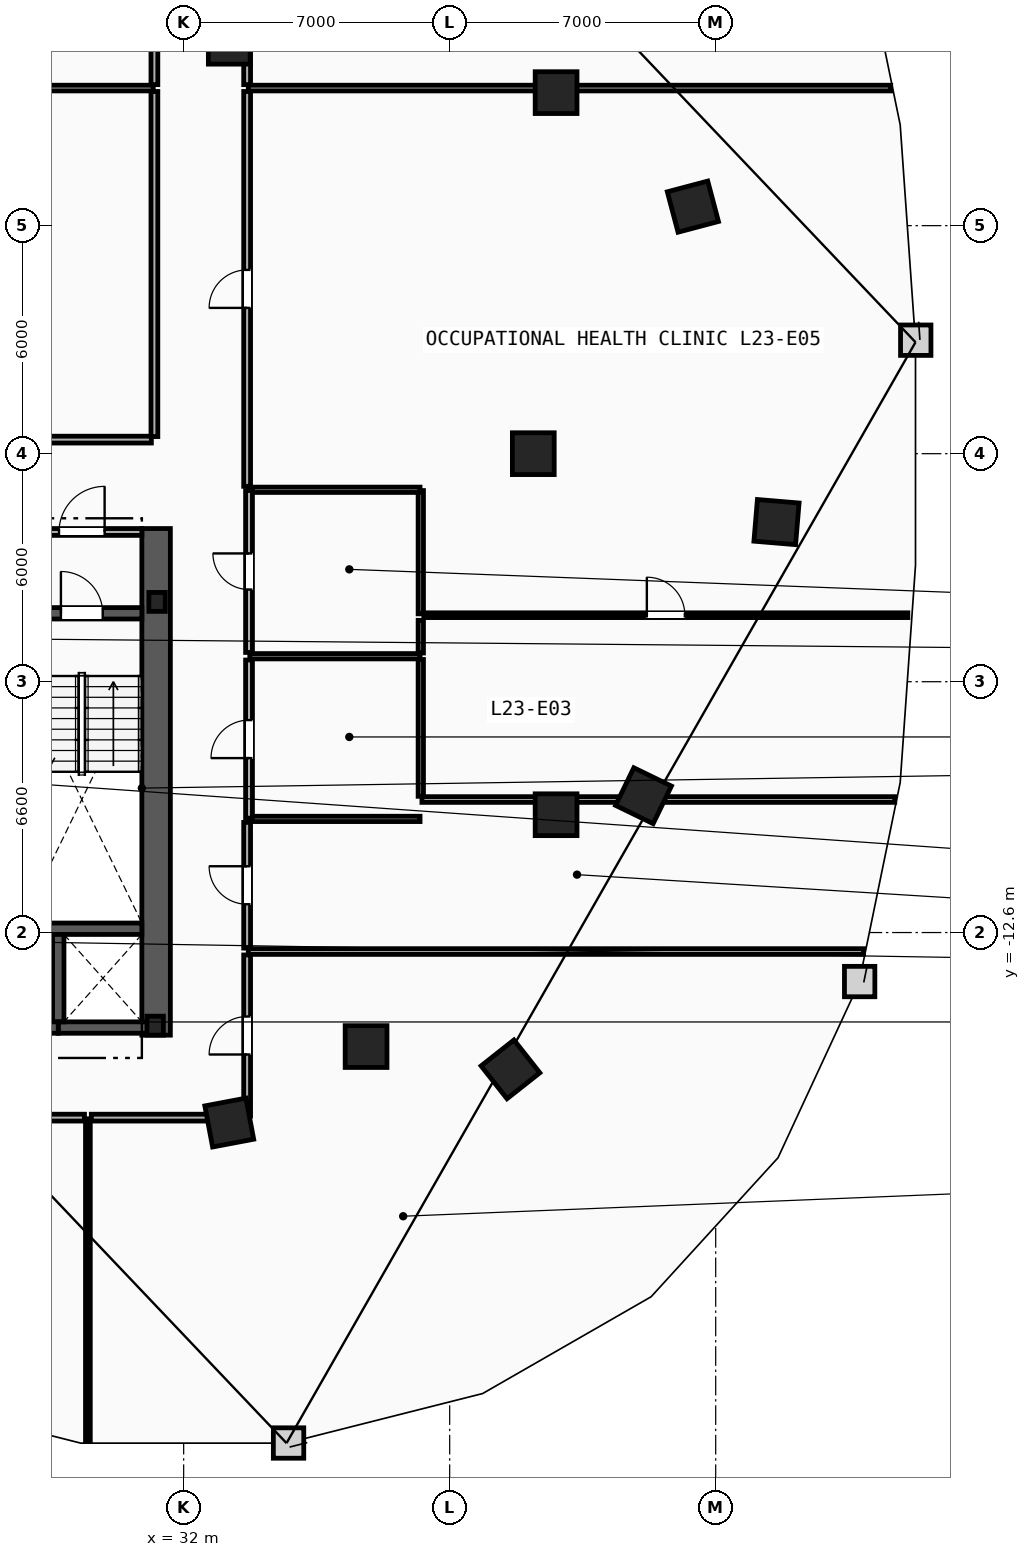
"""IFC4 building model, lengths in metres.
Left out: names, types, materials, properties, quantities, classifications, styles, units other than length and angle.
Written with IfcOpenShell. Run it as: python <this file> out.ifc"""

import sys

from ifc_helpers import new_model, si_unit, direction, frame, frame_2d, origin, origin_2d, place, context, subcontext, project, spatial, rectangle, i_section, extrude, element, fill, save


model = new_model("IFC4")
c1 = context("Model", 3, precision=1e-05, world=origin(), true_north=direction((0.0, 1.0)))
c2 = subcontext(c1, "Body", "Model", "MODEL_VIEW")
j1 = project(units=[si_unit("LENGTHUNIT", "METRE"), si_unit("PLANEANGLEUNIT", "RADIAN")], contexts=[c1])
p1 = place(None, origin())
s1 = spatial("IfcSite", under=j1, at=p1, CompositionType="ELEMENT")
p2 = place(p1, origin())
s2 = spatial("IfcBuilding", under=s1, at=p2, CompositionType="ELEMENT")
p3 = place(p2, frame((0.0, 0.0, 92.6)))
s3 = spatial("IfcBuildingStorey", under=s2, at=p3, CompositionType="ELEMENT", Elevation=92.6)
for number, where, z_axis, x_axis in (
    (1, (31.3, -3.9, 0.0), (0.0, 0.0, 1.0), (1.0, 0.0, 0.0)),
    (2, (31.25, -15.05, 0.0), (0.0, 0.0, 1.0), (1.0, 0.0, 0.0)),
):
    element("IfcColumn", number, at=place(p3, frame(where, z_axis=z_axis, x_axis=x_axis)), inside=s3, PredefinedType="COLUMN", context=c2, shape_type="SweptSolid", body=[
        extrude(i_section(OverallWidth=0.432, OverallDepth=0.498, WebThickness=0.056, FlangeThickness=0.089, FilletRadius=0.018, at=origin_2d()), origin(), (0.0, 0.0, 1.0), 3.6),
    ])
for number, where, z_axis, x_axis in (
    (3, (41.2, 0.0, 0.0), (0.0, 0.0, 1.0), (1.0, 0.0, 0.0)),
    (4, (41.8, -9.5, 0.0), (0.0, 0.0, 1.0), (1.0, 0.0, 0.0)),
    (5, (36.8, -15.6, 0.0), (0.0, 0.0, 1.0), (1.0, 0.0, 0.0)),
    (6, (41.8, 9.5, 0.0), (0.0, 0.0, 1.0), (1.0, 0.0, 0.0)),
    (7, (33.2, 10.8, 0.0), (0.0, 0.0, 1.0), (1.0, 0.0, 0.0)),
    (8, (33.2, -17.6, 0.0), (0.0, 0.0, 1.0), (0.983, 0.186, 0.0)),
    (9, (40.6, -16.2, 0.0), (0.0, 0.0, 1.0), (0.785, 0.619, 0.0)),
    (10, (44.1, -9.0, 0.0), (0.0, 0.0, 1.0), (0.437, 0.899, 0.0)),
    (11, (47.6, -1.8, 0.0), (0.0, 0.0, 1.0), (0.084, 0.997, 0.0)),
    (12, (45.4, 6.5, 0.0), (0.0, 0.0, 1.0), (-0.256, 0.967, 0.0)),
):
    element("IfcColumn", number, at=place(p3, frame(where, z_axis=z_axis, x_axis=x_axis)), inside=s3, PredefinedType="COLUMN", context=c2, shape_type="SweptSolid", body=[
        extrude(rectangle(XDim=1.1, YDim=1.1, at=origin_2d()), origin(), (0.0, 0.0, 1.0), 3.6),
    ])
p4 = place(p3, frame((31.275, -15.3, 0.0), z_axis=(0.0, 0.0, 1.0), x_axis=(0.0, 1.0, 0.0)))
e13 = element("IfcWall", 13, at=p4, inside=s3, PredefinedType="SHEAR", context=c2, shape_type="SweptSolid", body=[
    extrude(rectangle(XDim=13.33, YDim=0.75, at=frame_2d((6.665, 0.0))), origin(), (0.0, 0.0, 1.0), 3.3),
])
p5 = place(p3, frame((27.74, -4.2, 0.0), z_axis=(0.0, 0.0, 1.0), x_axis=(1.0, 0.0, 0.0)))
e14 = element("IfcWall", 14, at=p5, inside=s3, PredefinedType="SHEAR", context=c2, shape_type="SweptSolid", body=[
    extrude(rectangle(XDim=3.16, YDim=0.3, at=frame_2d((1.58, 0.0))), origin(), (0.0, 0.0, 1.0), 3.3),
])
p6 = place(p5, frame((1.03, 0.0, 0.0)))
e15 = element("IfcOpeningElement", 15, at=p6, cuts=e14, PredefinedType="OPENING", context=c2, shape_type="SweptSolid", body=[
    extrude(rectangle(XDim=1.1, YDim=2.15, at=frame_2d((0.55, 1.075))), frame((0.0, 0.16, 0.0), z_axis=(0.0, -1.0, 0.0), x_axis=(1.0, 0.0, 0.0)), (0.0, 0.0, 1.0), 0.32),
])
p7 = place(p3, frame((27.74, -12.5, 0.0), z_axis=(0.0, 0.0, 1.0), x_axis=(1.0, 0.0, 0.0)))
e16 = element("IfcWall", 16, at=p7, inside=s3, PredefinedType="SHEAR", context=c2, shape_type="SweptSolid", body=[
    extrude(rectangle(XDim=3.16, YDim=0.3, at=frame_2d((1.58, 0.0))), origin(), (0.0, 0.0, 1.0), 3.3),
])
p8 = place(p3, frame((27.74, -2.06, 0.0), z_axis=(0.0, 0.0, 1.0), x_axis=(1.0, 0.0, 0.0)))
e17 = element("IfcWall", 17, at=p8, inside=s3, PredefinedType="PARTITIONING", context=c2, shape_type="SweptSolid", body=[
    extrude(rectangle(XDim=3.16, YDim=0.18, at=frame_2d((1.58, 0.0))), origin(), (0.0, 0.0, 1.0), 3.3),
])
p9 = place(p8, frame((0.98, 0.0, 0.0)))
e18 = element("IfcOpeningElement", 18, at=p9, cuts=e17, PredefinedType="OPENING", context=c2, shape_type="SweptSolid", body=[
    extrude(rectangle(XDim=1.2, YDim=2.15, at=frame_2d((0.6, 1.075))), frame((0.0, 0.1, 0.0), z_axis=(0.0, -1.0, 0.0), x_axis=(1.0, 0.0, 0.0)), (0.0, 0.0, 1.0), 0.2),
])
p10 = place(p3, frame((28.7, -15.1, 0.0), z_axis=(0.0, 0.0, 1.0), x_axis=(1.0, 0.0, 0.0)))
e19 = element("IfcWall", 19, at=p10, inside=s3, PredefinedType="SHEAR", context=c2, shape_type="SweptSolid", body=[
    extrude(rectangle(XDim=2.5, YDim=0.3, at=frame_2d((1.25, 0.0))), origin(), (0.0, 0.0, 1.0), 3.3),
])
p11 = place(p3, frame((28.7, -14.95, 0.0), z_axis=(0.0, 0.0, 1.0), x_axis=(0.0, 1.0, 0.0)))
e20 = element("IfcWall", 20, at=p11, inside=s3, PredefinedType="SHEAR", context=c2, shape_type="SweptSolid", body=[
    extrude(rectangle(XDim=2.3, YDim=0.3, at=frame_2d((1.15, 0.0))), origin(), (0.0, 0.0, 1.0), 3.3),
])
p12 = place(p3, frame((26.2, -15.1, 0.0), z_axis=(0.0, 0.0, 1.0), x_axis=(1.0, 0.0, 0.0)))
e21 = element("IfcWall", 21, at=p12, inside=s3, PredefinedType="SHEAR", context=c2, shape_type="SweptSolid", body=[
    extrude(rectangle(XDim=2.5, YDim=0.3, at=frame_2d((1.25, 0.0))), origin(), (0.0, 0.0, 1.0), 3.3),
])
p13 = place(p3, frame((38.24, -9.015, 0.0), z_axis=(0.0, 0.0, 1.0), x_axis=(0.0, 1.0, 0.0)))
e22 = element("IfcWall", 22, at=p13, inside=s3, PredefinedType="PARTITIONING", context=c2, shape_type="SweptSolid", body=[
    extrude(rectangle(XDim=3.6, YDim=0.14, at=frame_2d((1.8, 0.0))), origin(), (0.0, 0.0, 1.0), 3.3),
])
p14 = place(p3, frame((38.24, -5.245, 0.0), z_axis=(0.0, 0.0, 1.0), x_axis=(0.0, 1.0, 0.0)))
e23 = element("IfcWall", 23, at=p14, inside=s3, PredefinedType="PARTITIONING", context=c2, shape_type="SweptSolid", body=[
    extrude(rectangle(XDim=0.86, YDim=0.14, at=frame_2d((0.43, 0.0))), origin(), (0.0, 0.0, 1.0), 3.3),
])
p15 = place(p3, frame((38.24, -4.215, 0.0), z_axis=(0.0, 0.0, 1.0), x_axis=(0.0, 1.0, 0.0)))
e24 = element("IfcWall", 24, at=p15, inside=s3, PredefinedType="PARTITIONING", context=c2, shape_type="SweptSolid", body=[
    extrude(rectangle(XDim=3.245, YDim=0.14, at=frame_2d((1.623, 0.0))), origin(), (0.0, 0.0, 1.0), 3.3),
])
for number, where, z_axis, x_axis in (
    (25, (33.74, -0.95, 0.0), (0.0, 0.0, 1.0), (1.0, 0.0, 0.0)),
    (26, (33.74, -5.33, 0.0), (0.0, 0.0, 1.0), (1.0, 0.0, 0.0)),
    (27, (33.74, -9.61, 0.0), (0.0, 0.0, 1.0), (1.0, 0.0, 0.0)),
):
    element("IfcWall", number, at=place(p3, frame(where, z_axis=z_axis, x_axis=x_axis)), inside=s3, PredefinedType="PARTITIONING", context=c2, shape_type="SweptSolid", body=[
        extrude(rectangle(XDim=4.48, YDim=0.14, at=frame_2d((2.24, 0.0))), origin(), (0.0, 0.0, 1.0), 3.3),
    ])
p16 = place(p3, frame((33.72, -5.23, 0.0), z_axis=(0.0, 0.0, 1.0), x_axis=(0.0, 1.0, 0.0)))
e28 = element("IfcWall", 28, at=p16, inside=s3, PredefinedType="PARTITIONING", context=c2, shape_type="SweptSolid", body=[
    extrude(rectangle(XDim=4.26, YDim=0.18, at=frame_2d((2.13, 0.0))), origin(), (0.0, 0.0, 1.0), 3.3),
])
p17 = place(p16, frame((1.655, 0.0, 0.0)))
e29 = element("IfcOpeningElement", 29, at=p17, cuts=e28, PredefinedType="OPENING", context=c2, shape_type="SweptSolid", body=[
    extrude(rectangle(XDim=0.95, YDim=2.1, at=frame_2d((0.475, 1.05))), frame((0.0, 0.1, 0.0), z_axis=(0.0, -1.0, 0.0), x_axis=(1.0, 0.0, 0.0)), (0.0, 0.0, 1.0), 0.2),
])
p18 = place(p3, frame((33.72, -9.59, 0.0), z_axis=(0.0, 0.0, 1.0), x_axis=(0.0, 1.0, 0.0)))
e30 = element("IfcWall", 30, at=p18, inside=s3, PredefinedType="PARTITIONING", context=c2, shape_type="SweptSolid", body=[
    extrude(rectangle(XDim=4.16, YDim=0.18, at=frame_2d((2.08, 0.0))), origin(), (0.0, 0.0, 1.0), 3.3),
])
p19 = place(p18, frame((1.58, 0.0, 0.0)))
e31 = element("IfcOpeningElement", 31, at=p19, cuts=e30, PredefinedType="OPENING", context=c2, shape_type="SweptSolid", body=[
    extrude(rectangle(XDim=1.0, YDim=2.15, at=frame_2d((0.5, 1.075))), frame((0.0, 0.1, 0.0), z_axis=(0.0, -1.0, 0.0), x_axis=(1.0, 0.0, 0.0)), (0.0, 0.0, 1.0), 0.2),
])
p20 = place(p3, frame((13.395, 9.62, 0.0), z_axis=(0.0, 0.0, 1.0), x_axis=(1.0, 0.0, 0.0)))
e32 = element("IfcWall", 32, at=p20, inside=s3, PredefinedType="PARTITIONING", context=c2, shape_type="SweptSolid", body=[
    extrude(rectangle(XDim=17.805, YDim=0.15, at=frame_2d((8.903, 0.0))), origin(), (0.0, 0.0, 1.0), 2.605),
])
p21 = place(p3, frame((33.7, 9.62, 0.0), z_axis=(0.0, 0.0, 1.0), x_axis=(1.0, 0.0, 0.0)))
e33 = element("IfcWall", 33, at=p21, inside=s3, PredefinedType="PARTITIONING", context=c2, shape_type="SweptSolid", body=[
    extrude(rectangle(XDim=16.906, YDim=0.15, at=frame_2d((8.453, 0.0))), origin(), (0.0, 0.0, 1.0), 2.605),
])
p22 = place(p3, frame((38.27, -9.1, 0.0), z_axis=(0.0, 0.0, 1.0), x_axis=(1.0, 0.0, 0.0)))
e34 = element("IfcWall", 34, at=p22, inside=s3, PredefinedType="PARTITIONING", context=c2, shape_type="SweptSolid", body=[
    extrude(rectangle(XDim=12.442, YDim=0.15, at=frame_2d((6.221, 0.0))), origin(), (0.0, 0.0, 1.0), 3.3),
])
p23 = place(p3, frame((33.7, -13.1, 0.0), z_axis=(0.0, 0.0, 1.0), x_axis=(1.0, 0.0, 0.0)))
e35 = element("IfcWall", 35, at=p23, inside=s3, PredefinedType="PARTITIONING", context=c2, shape_type="SweptSolid", body=[
    extrude(rectangle(XDim=16.19, YDim=0.15, at=frame_2d((8.095, 0.0))), origin(), (0.0, 0.0, 1.0), 3.3),
])
p24 = place(p3, frame((29.48, -25.985, 0.0), z_axis=(0.0, 0.0, 1.0), x_axis=(0.0, 1.0, 0.0)))
e36 = element("IfcWall", 36, at=p24, inside=s3, PredefinedType="PARTITIONING", context=c2, shape_type="SweptSolid", body=[
    extrude(rectangle(XDim=8.485, YDim=0.125, at=frame_2d((4.243, 0.0))), origin(), (0.0, 0.0, 1.0), 3.3),
])
p25 = place(p3, frame((33.67, -17.428, 0.0), z_axis=(0.0, 0.0, 1.0), x_axis=(0.0, 1.0, 0.0)))
e37 = element("IfcWall", 37, at=p25, inside=s3, PredefinedType="PARTITIONING", context=c2, shape_type="SweptSolid", body=[
    extrude(rectangle(XDim=4.239, YDim=0.18, at=frame_2d((2.119, 0.0))), origin(), (0.0, 0.0, 1.0), 3.3),
])
p26 = place(p25, frame((1.619, 0.0, 0.0)))
e38 = element("IfcOpeningElement", 38, at=p26, cuts=e37, PredefinedType="OPENING", context=c2, shape_type="SweptSolid", body=[
    extrude(rectangle(XDim=1.0, YDim=2.15, at=frame_2d((0.5, 1.075))), frame((0.0, 0.1, 0.0), z_axis=(0.0, -1.0, 0.0), x_axis=(1.0, 0.0, 0.0)), (0.0, 0.0, 1.0), 0.2),
])
p27 = place(p3, frame((29.57, -17.47, 0.0), z_axis=(0.0, 0.0, 1.0), x_axis=(1.0, 0.0, 0.0)))
e39 = element("IfcWall", 39, at=p27, inside=s3, PredefinedType="PARTITIONING", context=c2, shape_type="SweptSolid", body=[
    extrude(rectangle(XDim=4.058, YDim=0.18, at=frame_2d((2.029, 0.0))), origin(), (0.0, 0.0, 1.0), 3.3),
])
p28 = place(p3, frame((33.67, -13.01, 0.0), z_axis=(0.0, 0.0, 1.0), x_axis=(0.0, 1.0, 0.0)))
e40 = element("IfcWall", 40, at=p28, inside=s3, PredefinedType="PARTITIONING", context=c2, shape_type="SweptSolid", body=[
    extrude(rectangle(XDim=3.309, YDim=0.18, at=frame_2d((1.654, 0.0))), origin(), (0.0, 0.0, 1.0), 3.3),
])
p29 = place(p28, frame((1.154, 0.0, 0.0)))
e41 = element("IfcOpeningElement", 41, at=p29, cuts=e40, PredefinedType="OPENING", context=c2, shape_type="SweptSolid", body=[
    extrude(rectangle(XDim=1.0, YDim=2.15, at=frame_2d((0.5, 1.075))), frame((0.0, 0.1, 0.0), z_axis=(0.0, -1.0, 0.0), x_axis=(1.0, 0.0, 0.0)), (0.0, 0.0, 1.0), 0.2),
])
p30 = place(p3, frame((31.15, 0.37, 0.0), z_axis=(0.0, 0.0, 1.0), x_axis=(-1.0, 0.0, 0.0)))
e42 = element("IfcWall", 42, at=p30, inside=s3, PredefinedType="PARTITIONING", context=c2, shape_type="SweptSolid", body=[
    extrude(rectangle(XDim=14.328, YDim=0.18, at=frame_2d((7.164, 0.0))), origin(), (0.0, 0.0, 1.0), 3.3),
])
p31 = place(p30, frame((6.664, 0.0, 0.0)))
e43 = element("IfcOpeningElement", 43, at=p31, cuts=e42, PredefinedType="OPENING", context=c2, shape_type="SweptSolid", body=[
    extrude(rectangle(XDim=1.0, YDim=2.15, at=frame_2d((0.5, 1.075))), frame((0.0, 0.1, 0.0), z_axis=(0.0, -1.0, 0.0), x_axis=(1.0, 0.0, 0.0)), (0.0, 0.0, 1.0), 0.2),
])
p32 = place(p3, frame((16.822, -17.47, 0.0), z_axis=(0.0, 0.0, 1.0), x_axis=(1.0, 0.0, 0.0)))
e44 = element("IfcWall", 44, at=p32, inside=s3, PredefinedType="PARTITIONING", context=c2, shape_type="SweptSolid", body=[
    extrude(rectangle(XDim=12.568, YDim=0.18, at=frame_2d((6.284, 0.0))), origin(), (0.0, 0.0, 1.0), 3.3),
])
p33 = place(p3, frame((31.23, 9.53, 0.0), z_axis=(0.0, 0.0, 1.0), x_axis=(0.0, -1.0, 0.0)))
e45 = element("IfcWall", 45, at=p33, inside=s3, PredefinedType="PARTITIONING", context=c2, shape_type="SweptSolid", body=[
    extrude(rectangle(XDim=9.08, YDim=0.18, at=frame_2d((4.54, 0.0))), origin(), (0.0, 0.0, 1.0), 3.3),
])
p34 = place(p3, frame((33.67, -0.859, 0.0), z_axis=(0.0, 0.0, 1.0), x_axis=(0.0, 1.0, 0.0)))
e46 = element("IfcWall", 46, at=p34, inside=s3, PredefinedType="PARTITIONING", context=c2, shape_type="SweptSolid", body=[
    extrude(rectangle(XDim=10.389, YDim=0.18, at=frame_2d((5.194, 0.0))), origin(), (0.0, 0.0, 1.0), 3.3),
])
p35 = place(p34, frame((4.694, 0.0, 0.0)))
e47 = element("IfcOpeningElement", 47, at=p35, cuts=e46, PredefinedType="OPENING", context=c2, shape_type="SweptSolid", body=[
    extrude(rectangle(XDim=1.0, YDim=2.15, at=frame_2d((0.5, 1.075))), frame((0.0, 0.1, 0.0), z_axis=(0.0, -1.0, 0.0), x_axis=(1.0, 0.0, 0.0)), (0.0, 0.0, 1.0), 0.2),
])
for number, where, z_axis, x_axis in (
    (48, (33.67, 9.71, 0.0), (0.0, 0.0, 1.0), (0.0, 1.0, 0.0)),
    (49, (31.23, 11.4, 0.0), (0.0, 0.0, 1.0), (0.0, -1.0, 0.0)),
):
    element("IfcWall", number, at=place(p3, frame(where, z_axis=z_axis, x_axis=x_axis)), inside=s3, PredefinedType="PARTITIONING", context=c2, shape_type="SweptSolid", body=[
        extrude(rectangle(XDim=1.69, YDim=0.18, at=frame_2d((0.845, 0.0))), origin(), (0.0, 0.0, 1.0), 3.3),
    ])
p36 = place(p3, frame((38.32, -4.25, 0.0), z_axis=(0.0, 0.0, 1.0), x_axis=(1.0, 0.0, 0.0)))
e50 = element("IfcWall", 50, at=p36, inside=s3, PredefinedType="PARTITIONING", context=c2, shape_type="SweptSolid", body=[
    extrude(rectangle(XDim=12.737, YDim=0.125, at=frame_2d((6.368, 0.0))), origin(), (0.0, 0.0, 1.0), 3.3),
])
p37 = place(p36, frame((5.868, 0.0, 0.0)))
e51 = element("IfcOpeningElement", 51, at=p37, cuts=e50, PredefinedType="OPENING", context=c2, shape_type="SweptSolid", body=[
    extrude(rectangle(XDim=1.0, YDim=2.15, at=frame_2d((0.5, 1.075))), frame((0.0, 0.073, 0.0), z_axis=(0.0, -1.0, 0.0), x_axis=(1.0, 0.0, 0.0)), (0.0, 0.0, 1.0), 0.145),
])
p38 = place(p6, origin())
e52 = element("IfcDoor", 52, at=p38, inside=s3, OperationType="SINGLE_SWING_LEFT", PredefinedType="DOOR", context=c2, shape_type="SweptSolid", body=[
    extrude(rectangle(XDim=1.1, YDim=2.15, at=frame_2d((0.55, 1.075))), frame((0.0, 0.025, 0.0), z_axis=(0.0, -1.0, 0.0), x_axis=(1.0, 0.0, 0.0)), (0.0, 0.0, 1.0), 0.05),
])
fill(e15, e52)
p39 = place(p9, origin())
e53 = element("IfcDoor", 53, at=p39, inside=s3, OperationType="SINGLE_SWING_RIGHT", PredefinedType="DOOR", context=c2, shape_type="SweptSolid", body=[
    extrude(rectangle(XDim=1.2, YDim=2.15, at=frame_2d((0.6, 1.075))), frame((0.0, 0.025, 0.0), z_axis=(0.0, -1.0, 0.0), x_axis=(1.0, 0.0, 0.0)), (0.0, 0.0, 1.0), 0.05),
])
fill(e18, e53)
p40 = place(p37, origin())
e54 = element("IfcDoor", 54, at=p40, inside=s3, OperationType="SINGLE_SWING_LEFT", PredefinedType="DOOR", context=c2, shape_type="SweptSolid", body=[
    extrude(rectangle(XDim=1.0, YDim=2.15, at=frame_2d((0.5, 1.075))), frame((0.0, 0.025, 0.0), z_axis=(0.0, -1.0, 0.0), x_axis=(1.0, 0.0, 0.0)), (0.0, 0.0, 1.0), 0.05),
])
fill(e51, e54)
p41 = place(p35, origin())
e55 = element("IfcDoor", 55, at=p41, inside=s3, OperationType="SINGLE_SWING_LEFT", PredefinedType="DOOR", context=c2, shape_type="SweptSolid", body=[
    extrude(rectangle(XDim=1.0, YDim=2.15, at=frame_2d((0.5, 1.075))), frame((0.0, 0.025, 0.0), z_axis=(0.0, -1.0, 0.0), x_axis=(1.0, 0.0, 0.0)), (0.0, 0.0, 1.0), 0.05),
])
fill(e47, e55)
p42 = place(p17, origin())
e56 = element("IfcDoor", 56, at=p42, inside=s3, OperationType="SINGLE_SWING_RIGHT", PredefinedType="DOOR", context=c2, shape_type="SweptSolid", body=[
    extrude(rectangle(XDim=0.95, YDim=2.1, at=frame_2d((0.475, 1.05))), frame((0.0, 0.025, 0.0), z_axis=(0.0, -1.0, 0.0), x_axis=(1.0, 0.0, 0.0)), (0.0, 0.0, 1.0), 0.05),
])
fill(e29, e56)
p43 = place(p26, origin())
e57 = element("IfcDoor", 57, at=p43, inside=s3, OperationType="SINGLE_SWING_LEFT", PredefinedType="DOOR", context=c2, shape_type="SweptSolid", body=[
    extrude(rectangle(XDim=1.0, YDim=2.15, at=frame_2d((0.5, 1.075))), frame((0.0, 0.025, 0.0), z_axis=(0.0, -1.0, 0.0), x_axis=(1.0, 0.0, 0.0)), (0.0, 0.0, 1.0), 0.05),
])
fill(e38, e57)
p44 = place(p19, origin())
e58 = element("IfcDoor", 58, at=p44, inside=s3, OperationType="SINGLE_SWING_LEFT", PredefinedType="DOOR", context=c2, shape_type="SweptSolid", body=[
    extrude(rectangle(XDim=1.0, YDim=2.15, at=frame_2d((0.5, 1.075))), frame((0.0, 0.025, 0.0), z_axis=(0.0, -1.0, 0.0), x_axis=(1.0, 0.0, 0.0)), (0.0, 0.0, 1.0), 0.05),
])
fill(e31, e58)
p45 = place(p29, origin())
e59 = element("IfcDoor", 59, at=p45, inside=s3, OperationType="SINGLE_SWING_RIGHT", PredefinedType="DOOR", context=c2, shape_type="SweptSolid", body=[
    extrude(rectangle(XDim=1.0, YDim=2.15, at=frame_2d((0.5, 1.075))), frame((0.0, 0.025, 0.0), z_axis=(0.0, -1.0, 0.0), x_axis=(1.0, 0.0, 0.0)), (0.0, 0.0, 1.0), 0.05),
])
fill(e41, e59)
save(model, sys.argv[1])
